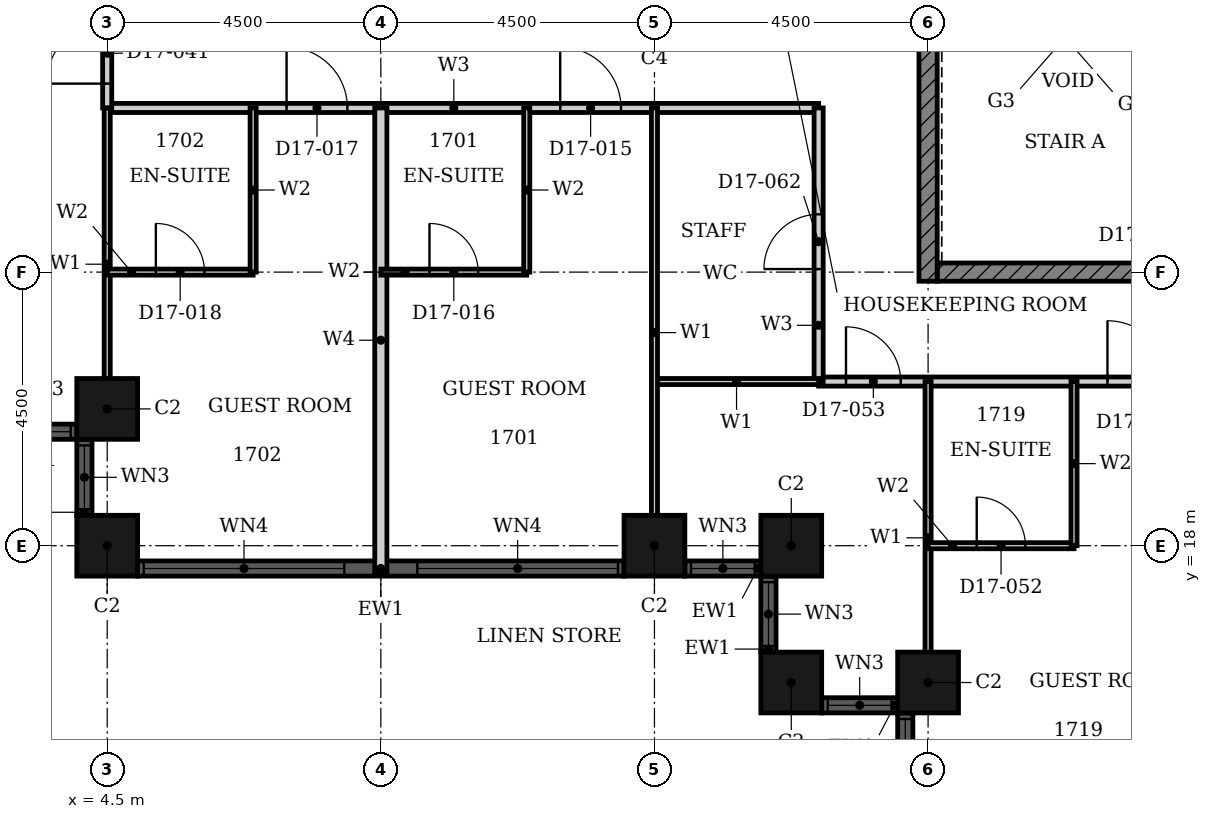
"""IFC4 building model, lengths in metres.
Left out: names, types, materials, properties, quantities, classifications, styles, units other than length and angle.
Written with IfcOpenShell. Run it as: python <this file> out.ifc"""

import sys

from ifc_helpers import new_model, si_unit, direction, frame, frame_2d, origin, origin_2d, place, context, subcontext, project, spatial, rectangle, hollow_rectangle, extrude, element, fill, save


model = new_model("IFC4")
c1 = context("Model", 3, precision=1e-05, world=origin(), true_north=direction((0.0, 1.0)))
c2 = subcontext(c1, "Body", "Model", "MODEL_VIEW")
j1 = project(units=[si_unit("LENGTHUNIT", "METRE"), si_unit("PLANEANGLEUNIT", "RADIAN")], contexts=[c1])
p1 = place(None, origin())
s1 = spatial("IfcSite", under=j1, at=p1, CompositionType="ELEMENT")
p2 = place(p1, origin())
s2 = spatial("IfcBuilding", under=s1, at=p2, CompositionType="ELEMENT")
p3 = place(p2, frame((0.0, 0.0, 74.4)))
s3 = spatial("IfcBuildingStorey", under=s2, at=p3, CompositionType="ELEMENT", Elevation=74.4)
for number, where, z_axis, x_axis in (
    (1, (4.5, 20.25, 0.0), (0.0, 0.0, 1.0), (1.0, 0.0, 0.0)),
    (2, (4.5, 18.0, 0.0), (0.0, 0.0, 1.0), (1.0, 0.0, 0.0)),
    (3, (13.5, 18.0, 0.0), (0.0, 0.0, 1.0), (1.0, 0.0, 0.0)),
    (4, (15.75, 18.0, 0.0), (0.0, 0.0, 1.0), (1.0, 0.0, 0.0)),
    (5, (15.75, 15.75, 0.0), (0.0, 0.0, 1.0), (1.0, 0.0, 0.0)),
    (6, (18.0, 15.75, 0.0), (0.0, 0.0, 1.0), (1.0, 0.0, 0.0)),
):
    element("IfcColumn", number, at=place(p3, frame(where, z_axis=z_axis, x_axis=x_axis)), inside=s3, PredefinedType="COLUMN", context=c2, shape_type="SweptSolid", body=[
        extrude(hollow_rectangle(XDim=1.0, YDim=1.0, WallThickness=0.032, at=origin_2d()), origin(), (0.0, 0.0, 1.0), 3.6),
    ])
p4 = place(p3, frame((2.75, 19.875, 0.0), z_axis=(0.0, 0.0, 1.0), x_axis=(1.0, 0.0, 0.0)))
e7 = element("IfcWall", 7, at=p4, inside=s3, PredefinedType="SOLIDWALL", context=c2, shape_type="SweptSolid", body=[
    extrude(rectangle(XDim=1.25, YDim=0.25, at=frame_2d((0.625, 0.0))), origin(), (0.0, 0.0, 1.0), 3.6),
])
p5 = place(p4, frame((0.1, 0.0, 0.9)))
e8 = element("IfcOpeningElement", 8, at=p5, cuts=e7, PredefinedType="OPENING", context=c2, shape_type="SweptSolid", body=[
    extrude(rectangle(XDim=1.05, YDim=2.08, at=frame_2d((0.525, 1.04))), frame((0.0, 0.135, 0.0), z_axis=(0.0, -1.0, 0.0), x_axis=(1.0, 0.0, 0.0)), (0.0, 0.0, 1.0), 0.27),
])
p6 = place(p3, frame((4.125, 19.75, 0.0), z_axis=(0.0, 0.0, 1.0), x_axis=(0.0, -1.0, 0.0)))
e9 = element("IfcWall", 9, at=p6, inside=s3, PredefinedType="SOLIDWALL", context=c2, shape_type="SweptSolid", body=[
    extrude(rectangle(XDim=1.25, YDim=0.25, at=frame_2d((0.625, 0.0))), origin(), (0.0, 0.0, 1.0), 3.6),
])
p7 = place(p6, frame((0.1, 0.0, 0.9)))
e10 = element("IfcOpeningElement", 10, at=p7, cuts=e9, PredefinedType="OPENING", context=c2, shape_type="SweptSolid", body=[
    extrude(rectangle(XDim=1.05, YDim=2.08, at=frame_2d((0.525, 1.04))), frame((0.0, 0.135, 0.0), z_axis=(0.0, -1.0, 0.0), x_axis=(1.0, 0.0, 0.0)), (0.0, 0.0, 1.0), 0.27),
])
p8 = place(p3, frame((5.0, 17.625, 0.0), z_axis=(0.0, 0.0, 1.0), x_axis=(1.0, 0.0, 0.0)))
e11 = element("IfcWall", 11, at=p8, inside=s3, PredefinedType="SOLIDWALL", context=c2, shape_type="SweptSolid", body=[
    extrude(rectangle(XDim=8.0, YDim=0.25, at=frame_2d((4.0, 0.0))), origin(), (0.0, 0.0, 1.0), 3.6),
])
p9 = place(p8, frame((0.1, 0.0, 0.9)))
e12 = element("IfcOpeningElement", 12, at=p9, cuts=e11, PredefinedType="OPENING", context=c2, shape_type="SweptSolid", body=[
    extrude(rectangle(XDim=3.3, YDim=2.08, at=frame_2d((1.65, 1.04))), frame((0.0, 0.135, 0.0), z_axis=(0.0, -1.0, 0.0), x_axis=(1.0, 0.0, 0.0)), (0.0, 0.0, 1.0), 0.27),
])
p10 = place(p8, frame((4.6, 0.0, 0.9)))
e13 = element("IfcOpeningElement", 13, at=p10, cuts=e11, PredefinedType="OPENING", context=c2, shape_type="SweptSolid", body=[
    extrude(rectangle(XDim=3.3, YDim=2.08, at=frame_2d((1.65, 1.04))), frame((0.0, 0.135, 0.0), z_axis=(0.0, -1.0, 0.0), x_axis=(1.0, 0.0, 0.0)), (0.0, 0.0, 1.0), 0.27),
])
p11 = place(p3, frame((14.0, 17.625, 0.0), z_axis=(0.0, 0.0, 1.0), x_axis=(1.0, 0.0, 0.0)))
e14 = element("IfcWall", 14, at=p11, inside=s3, PredefinedType="SOLIDWALL", context=c2, shape_type="SweptSolid", body=[
    extrude(rectangle(XDim=1.25, YDim=0.25, at=frame_2d((0.625, 0.0))), origin(), (0.0, 0.0, 1.0), 3.6),
])
p12 = place(p11, frame((0.1, 0.0, 0.9)))
e15 = element("IfcOpeningElement", 15, at=p12, cuts=e14, PredefinedType="OPENING", context=c2, shape_type="SweptSolid", body=[
    extrude(rectangle(XDim=1.05, YDim=2.08, at=frame_2d((0.525, 1.04))), frame((0.0, 0.135, 0.0), z_axis=(0.0, -1.0, 0.0), x_axis=(1.0, 0.0, 0.0)), (0.0, 0.0, 1.0), 0.27),
])
p13 = place(p3, frame((15.375, 17.5, 0.0), z_axis=(0.0, 0.0, 1.0), x_axis=(0.0, -1.0, 0.0)))
e16 = element("IfcWall", 16, at=p13, inside=s3, PredefinedType="SOLIDWALL", context=c2, shape_type="SweptSolid", body=[
    extrude(rectangle(XDim=1.25, YDim=0.25, at=frame_2d((0.625, 0.0))), origin(), (0.0, 0.0, 1.0), 3.6),
])
p14 = place(p13, frame((0.1, 0.0, 0.9)))
e17 = element("IfcOpeningElement", 17, at=p14, cuts=e16, PredefinedType="OPENING", context=c2, shape_type="SweptSolid", body=[
    extrude(rectangle(XDim=1.05, YDim=2.08, at=frame_2d((0.525, 1.04))), frame((0.0, 0.135, 0.0), z_axis=(0.0, -1.0, 0.0), x_axis=(1.0, 0.0, 0.0)), (0.0, 0.0, 1.0), 0.27),
])
p15 = place(p3, frame((16.25, 15.375, 0.0), z_axis=(0.0, 0.0, 1.0), x_axis=(1.0, 0.0, 0.0)))
e18 = element("IfcWall", 18, at=p15, inside=s3, PredefinedType="SOLIDWALL", context=c2, shape_type="SweptSolid", body=[
    extrude(rectangle(XDim=1.25, YDim=0.25, at=frame_2d((0.625, 0.0))), origin(), (0.0, 0.0, 1.0), 3.6),
])
p16 = place(p15, frame((0.1, 0.0, 0.9)))
e19 = element("IfcOpeningElement", 19, at=p16, cuts=e18, PredefinedType="OPENING", context=c2, shape_type="SweptSolid", body=[
    extrude(rectangle(XDim=1.05, YDim=2.08, at=frame_2d((0.525, 1.04))), frame((0.0, 0.135, 0.0), z_axis=(0.0, -1.0, 0.0), x_axis=(1.0, 0.0, 0.0)), (0.0, 0.0, 1.0), 0.27),
])
p17 = place(p3, frame((17.625, 15.25, 0.0), z_axis=(0.0, 0.0, 1.0), x_axis=(0.0, -1.0, 0.0)))
e20 = element("IfcWall", 20, at=p17, inside=s3, PredefinedType="SOLIDWALL", context=c2, shape_type="SweptSolid", body=[
    extrude(rectangle(XDim=1.25, YDim=0.25, at=frame_2d((0.625, 0.0))), origin(), (0.0, 0.0, 1.0), 3.6),
])
p18 = place(p17, frame((0.1, 0.0, 0.9)))
e21 = element("IfcOpeningElement", 21, at=p18, cuts=e20, PredefinedType="OPENING", context=c2, shape_type="SweptSolid", body=[
    extrude(rectangle(XDim=1.05, YDim=2.08, at=frame_2d((0.525, 1.04))), frame((0.0, 0.135, 0.0), z_axis=(0.0, -1.0, 0.0), x_axis=(1.0, 0.0, 0.0)), (0.0, 0.0, 1.0), 0.27),
])
p19 = place(p3, frame((18.15, 22.5, 0.0), z_axis=(0.0, 0.0, 1.0), x_axis=(1.0, 0.0, 0.0)))
e22 = element("IfcWall", 22, at=p19, inside=s3, PredefinedType="SHEAR", context=c2, shape_type="SweptSolid", body=[
    extrude(rectangle(XDim=4.225, YDim=0.3, at=frame_2d((2.113, 0.0))), origin(), (0.0, 0.0, 1.0), 3.3),
])
p20 = place(p3, frame((18.0, 22.35, 0.0), z_axis=(0.0, 0.0, 1.0), x_axis=(0.0, 1.0, 0.0)))
e23 = element("IfcWall", 23, at=p20, inside=s3, PredefinedType="SHEAR", context=c2, shape_type="SweptSolid", body=[
    extrude(rectangle(XDim=9.3, YDim=0.3, at=frame_2d((4.65, 0.0))), origin(), (0.0, 0.0, 1.0), 3.3),
])
p21 = place(p3, frame((16.2, 20.7, 0.0), z_axis=(0.0, 0.0, 1.0), x_axis=(1.0, 0.0, 0.0)))
e24 = element("IfcWall", 24, at=p21, inside=s3, PredefinedType="PARTITIONING", context=c2, shape_type="SweptSolid", body=[
    extrude(rectangle(XDim=13.5, YDim=0.15, at=frame_2d((6.75, 0.0))), origin(), (0.0, 0.0, 1.0), 3.3),
])
p22 = place(p21, frame((4.75, 0.0, 0.0)))
e25 = element("IfcOpeningElement", 25, at=p22, cuts=e24, PredefinedType="OPENING", context=c2, shape_type="SweptSolid", body=[
    extrude(rectangle(XDim=1.0, YDim=2.1, at=frame_2d((0.5, 1.05))), frame((0.0, 0.085, 0.0), z_axis=(0.0, -1.0, 0.0), x_axis=(1.0, 0.0, 0.0)), (0.0, 0.0, 1.0), 0.17),
])
p23 = place(p21, frame((0.45, 0.0, 0.0)))
e26 = element("IfcOpeningElement", 26, at=p23, cuts=e24, PredefinedType="OPENING", context=c2, shape_type="SweptSolid", body=[
    extrude(rectangle(XDim=0.9, YDim=2.1, at=frame_2d((0.45, 1.05))), frame((0.0, 0.085, 0.0), z_axis=(0.0, -1.0, 0.0), x_axis=(1.0, 0.0, 0.0)), (0.0, 0.0, 1.0), 0.17),
])
p24 = place(p21, frame((9.45, 0.0, 0.0)))
e27 = element("IfcOpeningElement", 27, at=p24, cuts=e24, PredefinedType="OPENING", context=c2, shape_type="SweptSolid", body=[
    extrude(rectangle(XDim=0.9, YDim=2.1, at=frame_2d((0.45, 1.05))), frame((0.0, 0.085, 0.0), z_axis=(0.0, -1.0, 0.0), x_axis=(1.0, 0.0, 0.0)), (0.0, 0.0, 1.0), 0.17),
])
p25 = place(p3, frame((4.5, 25.2, 0.0), z_axis=(0.0, 0.0, 1.0), x_axis=(1.0, 0.0, 0.0)))
e28 = element("IfcWall", 28, at=p25, inside=s3, PredefinedType="PARTITIONING", context=c2, shape_type="SweptSolid", body=[
    extrude(rectangle(XDim=11.7, YDim=0.15, at=frame_2d((5.85, 0.0))), origin(), (0.0, 0.0, 1.0), 3.3),
])
p26 = place(p25, frame((7.45, 0.0, 0.0)))
e29 = element("IfcOpeningElement", 29, at=p26, cuts=e28, PredefinedType="OPENING", context=c2, shape_type="SweptSolid", body=[
    extrude(rectangle(XDim=1.0, YDim=2.1, at=frame_2d((0.5, 1.05))), frame((0.0, 0.085, 0.0), z_axis=(0.0, -1.0, 0.0), x_axis=(1.0, 0.0, 0.0)), (0.0, 0.0, 1.0), 0.17),
])
p27 = place(p25, frame((2.95, 0.0, 0.0)))
e30 = element("IfcOpeningElement", 30, at=p27, cuts=e28, PredefinedType="OPENING", context=c2, shape_type="SweptSolid", body=[
    extrude(rectangle(XDim=1.0, YDim=2.1, at=frame_2d((0.5, 1.05))), frame((0.0, 0.085, 0.0), z_axis=(0.0, -1.0, 0.0), x_axis=(1.0, 0.0, 0.0)), (0.0, 0.0, 1.0), 0.17),
])
p28 = place(p3, frame((16.2, 20.7, 0.0), z_axis=(0.0, 0.0, 1.0), x_axis=(0.0, 1.0, 0.0)))
e31 = element("IfcWall", 31, at=p28, inside=s3, PredefinedType="PARTITIONING", context=c2, shape_type="SweptSolid", body=[
    extrude(rectangle(XDim=4.5, YDim=0.15, at=frame_2d((2.25, 0.0))), origin(), (0.0, 0.0, 1.0), 3.3),
])
p29 = place(p28, frame((1.85, 0.0, 0.0)))
e32 = element("IfcOpeningElement", 32, at=p29, cuts=e31, PredefinedType="OPENING", context=c2, shape_type="SweptSolid", body=[
    extrude(rectangle(XDim=0.9, YDim=2.1, at=frame_2d((0.45, 1.05))), frame((0.0, 0.085, 0.0), z_axis=(0.0, -1.0, 0.0), x_axis=(1.0, 0.0, 0.0)), (0.0, 0.0, 1.0), 0.17),
])
p30 = place(p3, frame((4.5, 25.2, 0.0), z_axis=(0.0, 0.0, 1.0), x_axis=(0.0, 1.0, 0.0)))
e33 = element("IfcWall", 33, at=p30, inside=s3, PredefinedType="PARTITIONING", context=c2, shape_type="SweptSolid", body=[
    extrude(rectangle(XDim=1.8, YDim=0.15, at=frame_2d((0.9, 0.0))), origin(), (0.0, 0.0, 1.0), 3.3),
])
p31 = place(p30, frame((0.4, 0.0, 0.0)))
e34 = element("IfcOpeningElement", 34, at=p31, cuts=e33, PredefinedType="OPENING", context=c2, shape_type="SweptSolid", body=[
    extrude(rectangle(XDim=1.0, YDim=2.1, at=frame_2d((0.5, 1.05))), frame((0.0, 0.085, 0.0), z_axis=(0.0, -1.0, 0.0), x_axis=(1.0, 0.0, 0.0)), (0.0, 0.0, 1.0), 0.17),
])
p32 = place(p3, frame((13.5, 20.7, 0.0), z_axis=(0.0, 0.0, 1.0), x_axis=(1.0, 0.0, 0.0)))
e35 = element("IfcWall", 35, at=p32, inside=s3, PredefinedType="PARTITIONING", context=c2, shape_type="SweptSolid", body=[
    extrude(rectangle(XDim=2.7, YDim=0.1, at=frame_2d((1.35, 0.0))), origin(), (0.0, 0.0, 1.0), 3.3),
])
p33 = place(p3, frame((13.5, 17.81, 0.0), z_axis=(0.0, 0.0, 1.0), x_axis=(0.0, 1.0, 0.0)))
e36 = element("IfcWall", 36, at=p33, inside=s3, PredefinedType="PARTITIONING", context=c2, shape_type="SweptSolid", body=[
    extrude(rectangle(XDim=7.39, YDim=0.1, at=frame_2d((3.695, 0.0))), origin(), (0.0, 0.0, 1.0), 2.38),
])
for number, where, z_axis, x_axis in (
    (37, (18.0, 15.56, 0.0), (0.0, 0.0, 1.0), (0.0, 1.0, 0.0)),
    (38, (4.5, 20.06, 0.0), (0.0, 0.0, 1.0), (0.0, 1.0, 0.0)),
):
    element("IfcWall", number, at=place(p3, frame(where, z_axis=z_axis, x_axis=x_axis)), inside=s3, PredefinedType="PARTITIONING", context=c2, shape_type="SweptSolid", body=[
        extrude(rectangle(XDim=5.14, YDim=0.1, at=frame_2d((2.57, 0.0))), origin(), (0.0, 0.0, 1.0), 3.3),
    ])
p34 = place(p3, frame((9.0, 17.56, 0.0), z_axis=(0.0, 0.0, 1.0), x_axis=(0.0, 1.0, 0.0)))
e39 = element("IfcWall", 39, at=p34, inside=s3, PredefinedType="PARTITIONING", context=c2, shape_type="SweptSolid", body=[
    extrude(rectangle(XDim=7.64, YDim=0.2, at=frame_2d((3.82, 0.0))), origin(), (0.0, 0.0, 1.0), 3.3),
])
p35 = place(p3, frame((18.0, 18.0, 0.0), z_axis=(0.0, 0.0, 1.0), x_axis=(1.0, 0.0, 0.0)))
e40 = element("IfcWall", 40, at=p35, inside=s3, PredefinedType="PARTITIONING", context=c2, shape_type="SweptSolid", body=[
    extrude(rectangle(XDim=2.4, YDim=0.1, at=frame_2d((1.2, 0.0))), origin(), (0.0, 0.0, 1.0), 3.3),
])
p36 = place(p35, frame((0.8, 0.0, 0.0)))
e41 = element("IfcOpeningElement", 41, at=p36, cuts=e40, PredefinedType="OPENING", context=c2, shape_type="SweptSolid", body=[
    extrude(rectangle(XDim=0.8, YDim=2.1, at=frame_2d((0.4, 1.05))), frame((0.0, 0.06, 0.0), z_axis=(0.0, -1.0, 0.0), x_axis=(1.0, 0.0, 0.0)), (0.0, 0.0, 1.0), 0.12),
])
p37 = place(p3, frame((9.0, 22.5, 0.0), z_axis=(0.0, 0.0, 1.0), x_axis=(1.0, 0.0, 0.0)))
e42 = element("IfcWall", 42, at=p37, inside=s3, PredefinedType="PARTITIONING", context=c2, shape_type="SweptSolid", body=[
    extrude(rectangle(XDim=2.4, YDim=0.1, at=frame_2d((1.2, 0.0))), origin(), (0.0, 0.0, 1.0), 2.58),
])
p38 = place(p37, frame((0.8, 0.0, 0.0)))
e43 = element("IfcOpeningElement", 43, at=p38, cuts=e42, PredefinedType="OPENING", context=c2, shape_type="SweptSolid", body=[
    extrude(rectangle(XDim=0.8, YDim=2.1, at=frame_2d((0.4, 1.05))), frame((0.0, 0.06, 0.0), z_axis=(0.0, -1.0, 0.0), x_axis=(1.0, 0.0, 0.0)), (0.0, 0.0, 1.0), 0.12),
])
p39 = place(p3, frame((4.5, 22.5, 0.0), z_axis=(0.0, 0.0, 1.0), x_axis=(1.0, 0.0, 0.0)))
e44 = element("IfcWall", 44, at=p39, inside=s3, PredefinedType="PARTITIONING", context=c2, shape_type="SweptSolid", body=[
    extrude(rectangle(XDim=2.4, YDim=0.1, at=frame_2d((1.2, 0.0))), origin(), (0.0, 0.0, 1.0), 2.58),
])
p40 = place(p39, frame((0.8, 0.0, 0.0)))
e45 = element("IfcOpeningElement", 45, at=p40, cuts=e44, PredefinedType="OPENING", context=c2, shape_type="SweptSolid", body=[
    extrude(rectangle(XDim=0.8, YDim=2.1, at=frame_2d((0.4, 1.05))), frame((0.0, 0.06, 0.0), z_axis=(0.0, -1.0, 0.0), x_axis=(1.0, 0.0, 0.0)), (0.0, 0.0, 1.0), 0.12),
])
for number, where, z_axis, x_axis in (
    (46, (11.4, 22.5, 0.0), (0.0, 0.0, 1.0), (0.0, 1.0, 0.0)),
    (47, (20.4, 18.0, 0.0), (0.0, 0.0, 1.0), (0.0, 1.0, 0.0)),
    (48, (6.9, 22.5, 0.0), (0.0, 0.0, 1.0), (0.0, 1.0, 0.0)),
):
    element("IfcWall", number, at=place(p3, frame(where, z_axis=z_axis, x_axis=x_axis)), inside=s3, PredefinedType="PARTITIONING", context=c2, shape_type="SweptSolid", body=[
        extrude(rectangle(XDim=2.7, YDim=0.1, at=frame_2d((1.35, 0.0))), origin(), (0.0, 0.0, 1.0), 3.3),
    ])
p41 = place(p5, origin())
e49 = element("IfcWindow", 49, at=p41, inside=s3, PartitioningType="SINGLE_PANEL", PredefinedType="WINDOW", context=c2, shape_type="SweptSolid", body=[
    extrude(rectangle(XDim=1.05, YDim=2.08, at=frame_2d((0.525, 1.04))), frame((0.0, 0.03, 0.0), z_axis=(0.0, -1.0, 0.0), x_axis=(1.0, 0.0, 0.0)), (0.0, 0.0, 1.0), 0.06),
])
fill(e8, e49)
p42 = place(p7, origin())
e50 = element("IfcWindow", 50, at=p42, inside=s3, PartitioningType="SINGLE_PANEL", PredefinedType="WINDOW", context=c2, shape_type="SweptSolid", body=[
    extrude(rectangle(XDim=1.05, YDim=2.08, at=frame_2d((0.525, 1.04))), frame((0.0, 0.03, 0.0), z_axis=(0.0, -1.0, 0.0), x_axis=(1.0, 0.0, 0.0)), (0.0, 0.0, 1.0), 0.06),
])
fill(e10, e50)
p43 = place(p9, origin())
e51 = element("IfcWindow", 51, at=p43, inside=s3, PartitioningType="SINGLE_PANEL", PredefinedType="WINDOW", context=c2, shape_type="SweptSolid", body=[
    extrude(rectangle(XDim=3.3, YDim=2.08, at=frame_2d((1.65, 1.04))), frame((0.0, 0.03, 0.0), z_axis=(0.0, -1.0, 0.0), x_axis=(1.0, 0.0, 0.0)), (0.0, 0.0, 1.0), 0.06),
])
fill(e12, e51)
p44 = place(p10, origin())
e52 = element("IfcWindow", 52, at=p44, inside=s3, PartitioningType="SINGLE_PANEL", PredefinedType="WINDOW", context=c2, shape_type="SweptSolid", body=[
    extrude(rectangle(XDim=3.3, YDim=2.08, at=frame_2d((1.65, 1.04))), frame((0.0, 0.03, 0.0), z_axis=(0.0, -1.0, 0.0), x_axis=(1.0, 0.0, 0.0)), (0.0, 0.0, 1.0), 0.06),
])
fill(e13, e52)
p45 = place(p12, origin())
e53 = element("IfcWindow", 53, at=p45, inside=s3, PartitioningType="SINGLE_PANEL", PredefinedType="WINDOW", context=c2, shape_type="SweptSolid", body=[
    extrude(rectangle(XDim=1.05, YDim=2.08, at=frame_2d((0.525, 1.04))), frame((0.0, 0.03, 0.0), z_axis=(0.0, -1.0, 0.0), x_axis=(1.0, 0.0, 0.0)), (0.0, 0.0, 1.0), 0.06),
])
fill(e15, e53)
p46 = place(p14, origin())
e54 = element("IfcWindow", 54, at=p46, inside=s3, PartitioningType="SINGLE_PANEL", PredefinedType="WINDOW", context=c2, shape_type="SweptSolid", body=[
    extrude(rectangle(XDim=1.05, YDim=2.08, at=frame_2d((0.525, 1.04))), frame((0.0, 0.03, 0.0), z_axis=(0.0, -1.0, 0.0), x_axis=(1.0, 0.0, 0.0)), (0.0, 0.0, 1.0), 0.06),
])
fill(e17, e54)
p47 = place(p16, origin())
e55 = element("IfcWindow", 55, at=p47, inside=s3, PartitioningType="SINGLE_PANEL", PredefinedType="WINDOW", context=c2, shape_type="SweptSolid", body=[
    extrude(rectangle(XDim=1.05, YDim=2.08, at=frame_2d((0.525, 1.04))), frame((0.0, 0.03, 0.0), z_axis=(0.0, -1.0, 0.0), x_axis=(1.0, 0.0, 0.0)), (0.0, 0.0, 1.0), 0.06),
])
fill(e19, e55)
p48 = place(p18, origin())
e56 = element("IfcWindow", 56, at=p48, inside=s3, PartitioningType="SINGLE_PANEL", PredefinedType="WINDOW", context=c2, shape_type="SweptSolid", body=[
    extrude(rectangle(XDim=1.05, YDim=2.08, at=frame_2d((0.525, 1.04))), frame((0.0, 0.03, 0.0), z_axis=(0.0, -1.0, 0.0), x_axis=(1.0, 0.0, 0.0)), (0.0, 0.0, 1.0), 0.06),
])
fill(e21, e56)
p49 = place(p26, origin())
e57 = element("IfcDoor", 57, at=p49, inside=s3, OperationType="SINGLE_SWING_RIGHT", PredefinedType="DOOR", context=c2, shape_type="SweptSolid", body=[
    extrude(rectangle(XDim=1.0, YDim=2.1, at=frame_2d((0.5, 1.05))), frame((0.0, 0.025, 0.0), z_axis=(0.0, -1.0, 0.0), x_axis=(1.0, 0.0, 0.0)), (0.0, 0.0, 1.0), 0.05),
])
fill(e29, e57)
p50 = place(p38, origin())
e58 = element("IfcDoor", 58, at=p50, inside=s3, OperationType="SINGLE_SWING_LEFT", PredefinedType="DOOR", context=c2, shape_type="SweptSolid", body=[
    extrude(rectangle(XDim=0.8, YDim=2.1, at=frame_2d((0.4, 1.05))), frame((0.0, 0.025, 0.0), z_axis=(0.0, -1.0, 0.0), x_axis=(1.0, 0.0, 0.0)), (0.0, 0.0, 1.0), 0.05),
])
fill(e43, e58)
p51 = place(p27, origin())
e59 = element("IfcDoor", 59, at=p51, inside=s3, OperationType="SINGLE_SWING_RIGHT", PredefinedType="DOOR", context=c2, shape_type="SweptSolid", body=[
    extrude(rectangle(XDim=1.0, YDim=2.1, at=frame_2d((0.5, 1.05))), frame((0.0, 0.025, 0.0), z_axis=(0.0, -1.0, 0.0), x_axis=(1.0, 0.0, 0.0)), (0.0, 0.0, 1.0), 0.05),
])
fill(e30, e59)
p52 = place(p40, origin())
e60 = element("IfcDoor", 60, at=p52, inside=s3, OperationType="SINGLE_SWING_RIGHT", PredefinedType="DOOR", context=c2, shape_type="SweptSolid", body=[
    extrude(rectangle(XDim=0.8, YDim=2.1, at=frame_2d((0.4, 1.05))), frame((0.0, 0.025, 0.0), z_axis=(0.0, -1.0, 0.0), x_axis=(1.0, 0.0, 0.0)), (0.0, 0.0, 1.0), 0.05),
])
fill(e45, e60)
p53 = place(p31, origin())
e61 = element("IfcDoor", 61, at=p53, inside=s3, OperationType="SINGLE_SWING_RIGHT", PredefinedType="DOOR", context=c2, shape_type="SweptSolid", body=[
    extrude(rectangle(XDim=1.0, YDim=2.1, at=frame_2d((0.5, 1.05))), frame((0.0, 0.025, 0.0), z_axis=(0.0, -1.0, 0.0), x_axis=(1.0, 0.0, 0.0)), (0.0, 0.0, 1.0), 0.05),
])
fill(e34, e61)
p54 = place(p22, origin())
e62 = element("IfcDoor", 62, at=p54, inside=s3, OperationType="SINGLE_SWING_RIGHT", PredefinedType="DOOR", context=c2, shape_type="SweptSolid", body=[
    extrude(rectangle(XDim=1.0, YDim=2.1, at=frame_2d((0.5, 1.05))), frame((0.0, 0.025, 0.0), z_axis=(0.0, -1.0, 0.0), x_axis=(1.0, 0.0, 0.0)), (0.0, 0.0, 1.0), 0.05),
])
fill(e25, e62)
p55 = place(p36, origin())
e63 = element("IfcDoor", 63, at=p55, inside=s3, OperationType="SINGLE_SWING_LEFT", PredefinedType="DOOR", context=c2, shape_type="SweptSolid", body=[
    extrude(rectangle(XDim=0.8, YDim=2.1, at=frame_2d((0.4, 1.05))), frame((0.0, 0.025, 0.0), z_axis=(0.0, -1.0, 0.0), x_axis=(1.0, 0.0, 0.0)), (0.0, 0.0, 1.0), 0.05),
])
fill(e41, e63)
p56 = place(p23, origin())
e64 = element("IfcDoor", 64, at=p56, inside=s3, OperationType="SINGLE_SWING_RIGHT", PredefinedType="DOOR", context=c2, shape_type="SweptSolid", body=[
    extrude(rectangle(XDim=0.9, YDim=2.1, at=frame_2d((0.45, 1.05))), frame((0.0, 0.025, 0.0), z_axis=(0.0, -1.0, 0.0), x_axis=(1.0, 0.0, 0.0)), (0.0, 0.0, 1.0), 0.05),
])
fill(e26, e64)
p57 = place(p29, origin())
e65 = element("IfcDoor", 65, at=p57, inside=s3, OperationType="SINGLE_SWING_RIGHT", PredefinedType="DOOR", context=c2, shape_type="SweptSolid", body=[
    extrude(rectangle(XDim=0.9, YDim=2.1, at=frame_2d((0.45, 1.05))), frame((0.0, 0.025, 0.0), z_axis=(0.0, -1.0, 0.0), x_axis=(1.0, 0.0, 0.0)), (0.0, 0.0, 1.0), 0.05),
])
fill(e32, e65)
save(model, sys.argv[1])
